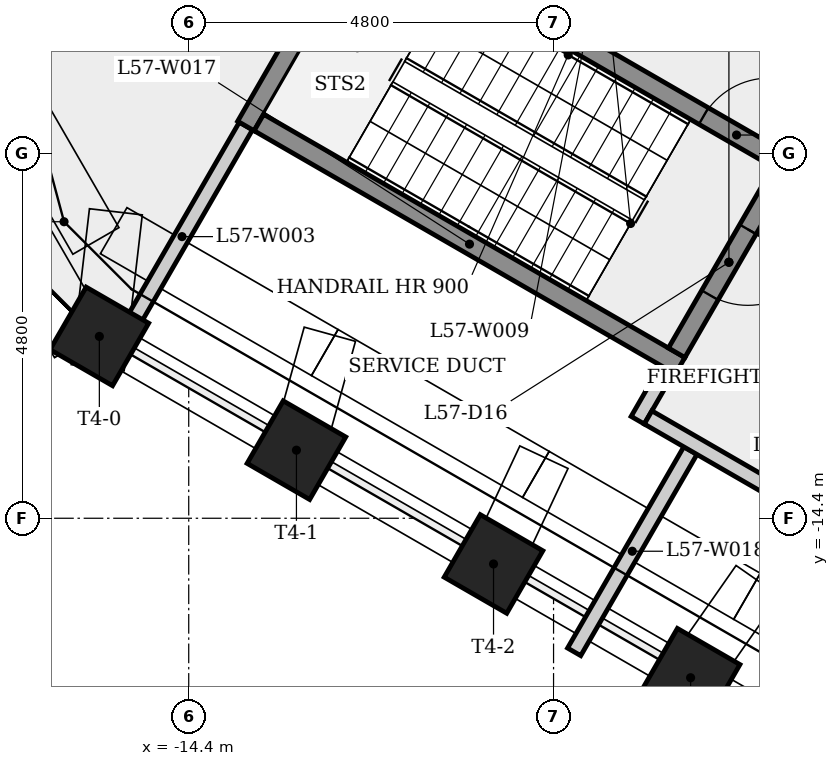
"""IFC4 building model, lengths in metres.
Left out: names, types, materials, properties, quantities, classifications, styles, units other than length and angle.
Written with IfcOpenShell. Run it as: python <this file> out.ifc"""

import sys

from ifc_helpers import new_model, si_unit, direction, frame, frame_2d, origin, origin_2d, place, context, subcontext, project, spatial, rectangle, extrude, element, fill, save


model = new_model("IFC4")
c1 = context("Model", 3, precision=1e-05, world=origin(), true_north=direction((0.0, 1.0)))
c2 = subcontext(c1, "Body", "Model", "MODEL_VIEW")
j1 = project(units=[si_unit("LENGTHUNIT", "METRE"), si_unit("PLANEANGLEUNIT", "RADIAN")], contexts=[c1])
p1 = place(None, origin())
s1 = spatial("IfcSite", under=j1, at=p1, CompositionType="ELEMENT")
p2 = place(p1, origin())
s2 = spatial("IfcBuilding", under=s1, at=p2, CompositionType="ELEMENT")
p3 = place(p2, frame((0.0, 0.0, 214.1)))
s3 = spatial("IfcBuildingStorey", under=s2, at=p3, CompositionType="ELEMENT", Elevation=214.1)
p4 = place(p3, frame((-9.35, -5.225, 0.0), z_axis=(0.0, 0.0, 1.0), x_axis=(0.866023993627, -0.500002442456, 0.0)))
e1 = element("IfcWall", 1, at=p4, inside=s3, PredefinedType="SHEAR", context=c2, shape_type="SweptSolid", body=[
    extrude(rectangle(XDim=10.97, YDim=0.6, at=frame_2d((5.485, 0.0))), origin(), (0.0, 0.0, 1.0), 4.8),
])
p5 = place(p4, frame((3.084, 0.0, 0.0)))
e2 = element("IfcOpeningElement", 2, at=p5, cuts=e1, PredefinedType="OPENING", context=c2, shape_type="SweptSolid", body=[
    extrude(rectangle(XDim=0.9, YDim=2.1, at=frame_2d((0.45, 1.05))), frame((0.0, 0.31, 0.0), z_axis=(0.0, -1.0, 0.0), x_axis=(1.0, 0.0, 0.0)), (0.0, 0.0, 1.0), 0.62),
])
p6 = place(p4, frame((8.21, 0.0, 0.0)))
e3 = element("IfcOpeningElement", 3, at=p6, cuts=e1, PredefinedType="OPENING", context=c2, shape_type="SweptSolid", body=[
    extrude(rectangle(XDim=0.9, YDim=2.1, at=frame_2d((0.45, 1.05))), frame((0.0, 0.31, 0.0), z_axis=(0.0, -1.0, 0.0), x_axis=(1.0, 0.0, 0.0)), (0.0, 0.0, 1.0), 0.62),
])
for number, where, z_axis, x_axis in (
    (4, (-15.576, -12.007, 0.0), (0.0, 0.0, 1.0), (-0.5, -0.866, 0.0)),
    (5, (-12.983, -13.504, 0.0), (0.0, 0.0, 1.0), (-0.5, -0.866, 0.0)),
    (6, (-10.39, -15.001, 0.0), (0.0, 0.0, 1.0), (-0.5, -0.866, 0.0)),
    (7, (-7.797, -16.499, 0.0), (0.0, 0.0, 1.0), (-0.5, -0.866, 0.0)),
):
    element("IfcColumn", number, at=place(p3, frame(where, z_axis=z_axis, x_axis=x_axis)), inside=s3, PredefinedType="COLUMN", context=c2, shape_type="SweptSolid", body=[
        extrude(rectangle(XDim=0.95, YDim=0.95, at=origin_2d()), origin(), (0.0, 0.0, 1.0), 4.45),
    ])
p7 = place(p3, frame((-15.329, -12.15, 0.0), z_axis=(0.0, 0.0, 1.0), x_axis=(0.49998231768, 0.866035612436, 0.0)))
e8 = element("IfcWall", 8, at=p7, inside=s3, PredefinedType="PLUMBINGWALL", context=c2, shape_type="SweptSolid", body=[
    extrude(rectangle(XDim=3.361, YDim=0.2, at=frame_2d((1.681, 0.0))), origin(), (0.0, 0.0, 1.0), 4.45),
])
p8 = place(p3, frame((-13.648, -9.239, 0.0), z_axis=(0.0, 0.0, 1.0), x_axis=(0.500017246033, 0.866015446554, 0.0)))
e9 = element("IfcWall", 9, at=p8, inside=s3, PredefinedType="SHEAR", context=c2, shape_type="SweptSolid", body=[
    extrude(rectangle(XDim=3.25, YDim=0.25, at=frame_2d((1.625, 0.0))), origin(), (0.0, 0.0, 1.0), 4.45),
])
p9 = place(p3, frame((-11.977, -6.595, 0.0), z_axis=(0.0, 0.0, 1.0), x_axis=(0.866025499775, -0.499999833739, 0.0)))
e10 = element("IfcWall", 10, at=p9, inside=s3, PredefinedType="SHEAR", context=c2, shape_type="SweptSolid", body=[
    extrude(rectangle(XDim=6.4, YDim=0.25, at=frame_2d((3.2, 0.0))), origin(), (0.0, 0.0, 1.0), 4.45),
])
p10 = place(p9, frame((5.025, 0.0, 0.0)))
e11 = element("IfcOpeningElement", 11, at=p10, cuts=e10, PredefinedType="OPENING", context=c2, shape_type="SweptSolid", body=[
    extrude(rectangle(XDim=1.0, YDim=2.1, at=frame_2d((0.5, 1.05))), frame((0.0, 0.135, 0.0), z_axis=(0.0, -1.0, 0.0), x_axis=(1.0, 0.0, 0.0)), (0.0, 0.0, 1.0), 0.27),
])
p11 = place(p3, frame((-8.493, -13.11, 0.0), z_axis=(0.0, 0.0, 1.0), x_axis=(0.500067724834, 0.865986299303, 0.0)))
e12 = element("IfcWall", 12, at=p11, inside=s3, PredefinedType="PLUMBINGWALL", context=c2, shape_type="SweptSolid", body=[
    extrude(rectangle(XDim=0.775, YDim=0.2, at=frame_2d((0.388, 0.0))), origin(), (0.0, 0.0, 1.0), 4.45),
])
p12 = place(p3, frame((-7.935, -12.393, 0.0), z_axis=(0.0, 0.0, 1.0), x_axis=(-0.866025499775, 0.499999833739, 0.0)))
e13 = element("IfcWall", 13, at=p12, inside=s3, PredefinedType="SHEAR", context=c2, shape_type="SweptSolid", body=[
    extrude(rectangle(XDim=6.4, YDim=0.25, at=frame_2d((3.2, 0.0))), origin(), (0.0, 0.0, 1.0), 4.45),
])
p13 = place(p3, frame((-7.8, -13.51, 0.0), z_axis=(0.0, 0.0, 1.0), x_axis=(-0.500003532061, -0.866023364538, 0.0)))
e14 = element("IfcWall", 14, at=p13, inside=s3, PredefinedType="PLUMBINGWALL", context=c2, shape_type="SweptSolid", body=[
    extrude(rectangle(XDim=3.058, YDim=0.2, at=frame_2d((1.529, 0.0))), origin(), (0.0, 0.0, 1.0), 4.45),
])
p14 = place(p3, frame((-8.356, -13.073, 0.0), z_axis=(0.0, 0.0, 1.0), x_axis=(0.866038532462, -0.499977259774, 0.0)))
e15 = element("IfcWall", 15, at=p14, inside=s3, PredefinedType="PLUMBINGWALL", context=c2, shape_type="SweptSolid", body=[
    extrude(rectangle(XDim=4.7, YDim=0.2, at=frame_2d((2.35, 0.0))), origin(), (0.0, 0.0, 1.0), 4.45),
])
p15 = place(p3, frame((-6.605, -9.841, 0.0), z_axis=(0.0, 0.0, 1.0), x_axis=(-0.499996545922, -0.866027397988, 0.0)))
e16 = element("IfcWall", 16, at=p15, inside=s3, PredefinedType="SHEAR", context=c2, shape_type="SweptSolid", body=[
    extrude(rectangle(XDim=2.75, YDim=0.25, at=frame_2d((1.375, 0.0))), origin(), (0.0, 0.0, 1.0), 4.45),
])
p16 = place(p15, frame((0.875, 0.0, 0.0)))
e17 = element("IfcOpeningElement", 17, at=p16, cuts=e16, PredefinedType="OPENING", context=c2, shape_type="SweptSolid", body=[
    extrude(rectangle(XDim=1.0, YDim=2.1, at=frame_2d((0.5, 1.05))), frame((0.0, 0.135, 0.0), z_axis=(0.0, -1.0, 0.0), x_axis=(1.0, 0.0, 0.0)), (0.0, 0.0, 1.0), 0.27),
])
p17 = place(p10, origin())
e18 = element("IfcDoor", 18, at=p17, inside=s3, OperationType="SINGLE_SWING_RIGHT", PredefinedType="DOOR", context=c2, shape_type="SweptSolid", body=[
    extrude(rectangle(XDim=1.0, YDim=2.1, at=frame_2d((0.5, 1.05))), frame((0.0, 0.025, 0.0), z_axis=(0.0, -1.0, 0.0), x_axis=(1.0, 0.0, 0.0)), (0.0, 0.0, 1.0), 0.05),
])
fill(e11, e18)
p18 = place(p16, origin())
e19 = element("IfcDoor", 19, at=p18, inside=s3, OperationType="SINGLE_SWING_LEFT", PredefinedType="DOOR", context=c2, shape_type="SweptSolid", body=[
    extrude(rectangle(XDim=1.0, YDim=2.1, at=frame_2d((0.5, 1.05))), frame((0.0, 0.025, 0.0), z_axis=(0.0, -1.0, 0.0), x_axis=(1.0, 0.0, 0.0)), (0.0, 0.0, 1.0), 0.05),
])
fill(e17, e19)
save(model, sys.argv[1])
